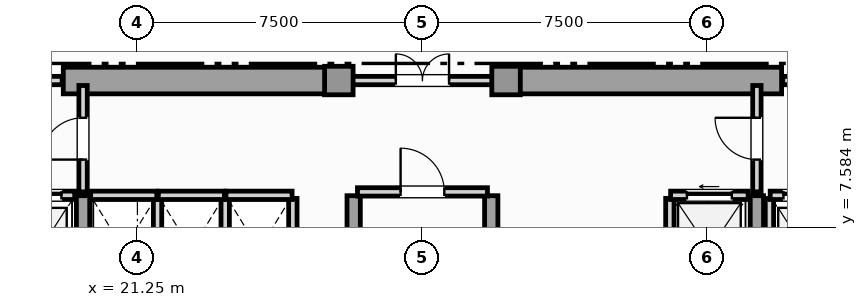
"""IFC4 building model, lengths in metres.
Left out: names, types, materials, properties, quantities, classifications, styles, units other than length and angle.
Written with IfcOpenShell. Run it as: python <this file> out.ifc"""

import sys

from ifc_helpers import new_model, si_unit, direction, frame, frame_2d, origin, origin_2d, place, context, subcontext, project, spatial, rectangle, extrude, element, fill, save


model = new_model("IFC4")
c1 = context("Model", 3, precision=1e-05, world=origin(), true_north=direction((0.0, 1.0)))
c2 = subcontext(c1, "Body", "Model", "MODEL_VIEW")
j1 = project(units=[si_unit("LENGTHUNIT", "METRE"), si_unit("PLANEANGLEUNIT", "RADIAN")], contexts=[c1])
p1 = place(None, origin())
s1 = spatial("IfcSite", under=j1, at=p1, CompositionType="ELEMENT")
p2 = place(p1, origin())
s2 = spatial("IfcBuilding", under=s1, at=p2, CompositionType="ELEMENT")
p3 = place(p2, frame((0.0, 0.0, 183.7)))
s3 = spatial("IfcBuildingStorey", under=s2, at=p3, CompositionType="ELEMENT", Elevation=183.7)
for number, where, z_axis, x_axis in (
    (1, (19.3, 11.45, 0.0), (0.0, 0.0, 1.0), (1.0, 0.0, 0.0)),
    (2, (30.9, 11.45, 0.0), (0.0, 0.0, 1.0), (1.0, 0.0, 0.0)),
):
    element("IfcWall", number, at=place(p3, frame(where, z_axis=z_axis, x_axis=x_axis)), inside=s3, PredefinedType="SHEAR", context=c2, shape_type="SweptSolid", body=[
        extrude(rectangle(XDim=7.3, YDim=0.7, at=frame_2d((3.65, 0.0))), origin(), (0.0, 0.0, 1.0), 3.63),
    ])
for number, where, z_axis, x_axis in (
    (3, (19.82, 0.92, 0.0), (0.0, 0.0, 1.0), (0.0, 1.0, 0.0)),
    (4, (26.94, 0.92, 0.0), (0.0, 0.0, 1.0), (0.0, 1.0, 0.0)),
    (5, (30.56, 0.92, 0.0), (0.0, 0.0, 1.0), (0.0, 1.0, 0.0)),
    (6, (37.55, 0.92, 0.0), (0.0, 0.0, 1.0), (0.0, 1.0, 0.0)),
):
    element("IfcWall", number, at=place(p3, frame(where, z_axis=z_axis, x_axis=x_axis)), inside=s3, PredefinedType="SHEAR", context=c2, shape_type="SweptSolid", body=[
        extrude(rectangle(XDim=7.5, YDim=0.35, at=frame_2d((3.75, 0.0))), origin(), (0.0, 0.0, 1.0), 3.63),
    ])
for number, where, z_axis, x_axis in (
    (7, (26.55, 11.45, 0.0), (0.0, 0.0, 1.0), (1.0, 0.0, 0.0)),
    (8, (30.95, 11.45, 0.0), (0.0, 0.0, 1.0), (1.0, 0.0, 0.0)),
):
    element("IfcColumn", number, at=place(p3, frame(where, z_axis=z_axis, x_axis=x_axis)), inside=s3, PredefinedType="COLUMN", context=c2, shape_type="SweptSolid", body=[
        extrude(rectangle(XDim=0.75, YDim=0.75, at=origin_2d()), origin(), (0.0, 0.0, 1.0), 3.85),
    ])
p4 = place(p3, frame((17.78, 8.43, 0.0), z_axis=(0.0, 0.0, 1.0), x_axis=(1.0, 0.0, 0.0)))
e9 = element("IfcWall", 9, at=p4, inside=s3, PredefinedType="SOLIDWALL", context=c2, shape_type="SweptSolid", body=[
    extrude(rectangle(XDim=1.82, YDim=0.22, at=frame_2d((0.91, 0.0))), origin(), (0.0, 0.0, 1.0), 3.63),
])
p5 = place(p4, frame((0.35, 0.0, 0.0)))
e10 = element("IfcOpeningElement", 10, at=p5, cuts=e9, PredefinedType="OPENING", context=c2, shape_type="SweptSolid", body=[
    extrude(rectangle(XDim=1.12, YDim=2.25, at=frame_2d((0.56, 1.125))), frame((0.0, 0.12, 0.0), z_axis=(0.0, -1.0, 0.0), x_axis=(1.0, 0.0, 0.0)), (0.0, 0.0, 1.0), 0.24),
])
p6 = place(p3, frame((37.88, 5.65, 0.0), z_axis=(0.0, 0.0, 1.0), x_axis=(0.0, 1.0, 0.0)))
e11 = element("IfcWall", 11, at=p6, inside=s3, PredefinedType="SOLIDWALL", context=c2, shape_type="SweptSolid", body=[
    extrude(rectangle(XDim=2.7, YDim=0.22, at=frame_2d((1.35, 0.0))), origin(), (0.0, 0.0, 1.0), 3.63),
])
p7 = place(p3, frame((37.9, 8.43, 0.0), z_axis=(0.0, 0.0, 1.0), x_axis=(1.0, 0.0, 0.0)))
e12 = element("IfcWall", 12, at=p7, inside=s3, PredefinedType="SOLIDWALL", context=c2, shape_type="SweptSolid", body=[
    extrude(rectangle(XDim=1.82, YDim=0.22, at=frame_2d((0.91, 0.0))), origin(), (0.0, 0.0, 1.0), 3.63),
])
p8 = place(p7, frame((0.35, 0.0, 0.0)))
e13 = element("IfcOpeningElement", 13, at=p8, cuts=e12, PredefinedType="OPENING", context=c2, shape_type="SweptSolid", body=[
    extrude(rectangle(XDim=1.12, YDim=2.25, at=frame_2d((0.56, 1.125))), frame((0.0, 0.12, 0.0), z_axis=(0.0, -1.0, 0.0), x_axis=(1.0, 0.0, 0.0)), (0.0, 0.0, 1.0), 0.24),
])
p9 = place(p3, frame((35.26, 5.65, 0.0), z_axis=(0.0, 0.0, 1.0), x_axis=(0.0, 1.0, 0.0)))
e14 = element("IfcWall", 14, at=p9, inside=s3, PredefinedType="SOLIDWALL", context=c2, shape_type="SweptSolid", body=[
    extrude(rectangle(XDim=2.7, YDim=0.22, at=frame_2d((1.35, 0.0))), origin(), (0.0, 0.0, 1.0), 3.63),
])
p10 = place(p3, frame((35.28, 8.43, 0.0), z_axis=(0.0, 0.0, 1.0), x_axis=(1.0, 0.0, 0.0)))
e15 = element("IfcWall", 15, at=p10, inside=s3, PredefinedType="SOLIDWALL", context=c2, shape_type="SweptSolid", body=[
    extrude(rectangle(XDim=2.04, YDim=0.22, at=frame_2d((1.02, 0.0))), origin(), (0.0, 0.0, 1.0), 3.63),
])
p11 = place(p10, frame((0.43, 0.0, 0.0)))
e16 = element("IfcOpeningElement", 16, at=p11, cuts=e15, PredefinedType="OPENING", context=c2, shape_type="SweptSolid", body=[
    extrude(rectangle(XDim=1.18, YDim=2.2, at=frame_2d((0.59, 1.1))), frame((0.0, 0.12, 0.0), z_axis=(0.0, -1.0, 0.0), x_axis=(1.0, 0.0, 0.0)), (0.0, 0.0, 1.0), 0.24),
])
p12 = place(p3, frame((21.78, 5.65, 0.0), z_axis=(0.0, 0.0, 1.0), x_axis=(0.0, 1.0, 0.0)))
e17 = element("IfcWall", 17, at=p12, inside=s3, PredefinedType="SOLIDWALL", context=c2, shape_type="SweptSolid", body=[
    extrude(rectangle(XDim=2.7, YDim=0.22, at=frame_2d((1.35, 0.0))), origin(), (0.0, 0.0, 1.0), 3.63),
])
p13 = place(p3, frame((20.02, 8.43, 0.0), z_axis=(0.0, 0.0, 1.0), x_axis=(1.0, 0.0, 0.0)))
e18 = element("IfcWall", 18, at=p13, inside=s3, PredefinedType="SOLIDWALL", context=c2, shape_type="SweptSolid", body=[
    extrude(rectangle(XDim=1.74, YDim=0.22, at=frame_2d((0.87, 0.0))), origin(), (0.0, 0.0, 1.0), 3.63),
])
p14 = place(p3, frame((23.56, 5.65, 0.0), z_axis=(0.0, 0.0, 1.0), x_axis=(0.0, 1.0, 0.0)))
e19 = element("IfcWall", 19, at=p14, inside=s3, PredefinedType="SOLIDWALL", context=c2, shape_type="SweptSolid", body=[
    extrude(rectangle(XDim=2.7, YDim=0.22, at=frame_2d((1.35, 0.0))), origin(), (0.0, 0.0, 1.0), 3.63),
])
p15 = place(p3, frame((21.8, 8.43, 0.0), z_axis=(0.0, 0.0, 1.0), x_axis=(1.0, 0.0, 0.0)))
e20 = element("IfcWall", 20, at=p15, inside=s3, PredefinedType="SOLIDWALL", context=c2, shape_type="SweptSolid", body=[
    extrude(rectangle(XDim=1.74, YDim=0.22, at=frame_2d((0.87, 0.0))), origin(), (0.0, 0.0, 1.0), 3.63),
])
p16 = place(p3, frame((25.34, 5.65, 0.0), z_axis=(0.0, 0.0, 1.0), x_axis=(0.0, 1.0, 0.0)))
e21 = element("IfcWall", 21, at=p16, inside=s3, PredefinedType="SOLIDWALL", context=c2, shape_type="SweptSolid", body=[
    extrude(rectangle(XDim=2.7, YDim=0.22, at=frame_2d((1.35, 0.0))), origin(), (0.0, 0.0, 1.0), 3.63),
])
p17 = place(p3, frame((23.58, 8.43, 0.0), z_axis=(0.0, 0.0, 1.0), x_axis=(1.0, 0.0, 0.0)))
e22 = element("IfcWall", 22, at=p17, inside=s3, PredefinedType="SOLIDWALL", context=c2, shape_type="SweptSolid", body=[
    extrude(rectangle(XDim=1.74, YDim=0.22, at=frame_2d((0.87, 0.0))), origin(), (0.0, 0.0, 1.0), 3.63),
])
p18 = place(p3, frame((27.04, 8.52, 0.0), z_axis=(0.0, 0.0, 1.0), x_axis=(1.0, 0.0, 0.0)))
e23 = element("IfcWall", 23, at=p18, inside=s3, PredefinedType="SOLIDWALL", context=c2, shape_type="SweptSolid", body=[
    extrude(rectangle(XDim=3.42, YDim=0.22, at=frame_2d((1.71, 0.0))), origin(), (0.0, 0.0, 1.0), 3.63),
])
p19 = place(p18, frame((1.135, 0.0, 0.0)))
e24 = element("IfcOpeningElement", 24, at=p19, cuts=e23, PredefinedType="OPENING", context=c2, shape_type="SweptSolid", body=[
    extrude(rectangle(XDim=1.15, YDim=2.2, at=frame_2d((0.575, 1.1))), frame((0.0, 0.12, 0.0), z_axis=(0.0, -1.0, 0.0), x_axis=(1.0, 0.0, 0.0)), (0.0, 0.0, 1.0), 0.24),
])
p20 = place(p3, frame((19.82, 8.52, 0.0), z_axis=(0.0, 0.0, 1.0), x_axis=(0.0, 1.0, 0.0)))
e25 = element("IfcWall", 25, at=p20, inside=s3, PredefinedType="SOLIDWALL", context=c2, shape_type="SweptSolid", body=[
    extrude(rectangle(XDim=2.8, YDim=0.22, at=frame_2d((1.4, 0.0))), origin(), (0.0, 0.0, 1.0), 3.085),
])
p21 = place(p20, frame((0.85, 0.0, 0.0)))
e26 = element("IfcOpeningElement", 26, at=p21, cuts=e25, PredefinedType="OPENING", context=c2, shape_type="SweptSolid", body=[
    extrude(rectangle(XDim=1.1, YDim=2.2, at=frame_2d((0.55, 1.1))), frame((0.0, 0.12, 0.0), z_axis=(0.0, -1.0, 0.0), x_axis=(1.0, 0.0, 0.0)), (0.0, 0.0, 1.0), 0.24),
])
p22 = place(p3, frame((37.55, 8.52, 0.0), z_axis=(0.0, 0.0, 1.0), x_axis=(0.0, 1.0, 0.0)))
e27 = element("IfcWall", 27, at=p22, inside=s3, PredefinedType="SOLIDWALL", context=c2, shape_type="SweptSolid", body=[
    extrude(rectangle(XDim=2.8, YDim=0.22, at=frame_2d((1.4, 0.0))), origin(), (0.0, 0.0, 1.0), 3.085),
])
p23 = place(p22, frame((0.85, 0.0, 0.0)))
e28 = element("IfcOpeningElement", 28, at=p23, cuts=e27, PredefinedType="OPENING", context=c2, shape_type="SweptSolid", body=[
    extrude(rectangle(XDim=1.1, YDim=2.2, at=frame_2d((0.55, 1.1))), frame((0.0, 0.12, 0.0), z_axis=(0.0, -1.0, 0.0), x_axis=(1.0, 0.0, 0.0)), (0.0, 0.0, 1.0), 0.24),
])
p24 = place(p3, frame((16.23, 11.45, 0.0), z_axis=(0.0, 0.0, 1.0), x_axis=(1.0, 0.0, 0.0)))
e29 = element("IfcWall", 29, at=p24, inside=s3, PredefinedType="SOLIDWALL", context=c2, shape_type="SweptSolid", body=[
    extrude(rectangle(XDim=3.04, YDim=0.22, at=frame_2d((1.52, 0.0))), origin(), (0.0, 0.0, 1.0), 3.63),
])
p25 = place(p24, frame((0.97, 0.0, 0.0)))
e30 = element("IfcOpeningElement", 30, at=p25, cuts=e29, PredefinedType="OPENING", context=c2, shape_type="SweptSolid", body=[
    extrude(rectangle(XDim=1.1, YDim=2.2, at=frame_2d((0.55, 1.1))), frame((0.0, 0.12, 0.0), z_axis=(0.0, -1.0, 0.0), x_axis=(1.0, 0.0, 0.0)), (0.0, 0.0, 1.0), 0.24),
])
p26 = place(p3, frame((26.63, 11.45, 0.0), z_axis=(0.0, 0.0, 1.0), x_axis=(1.0, 0.0, 0.0)))
e31 = element("IfcWall", 31, at=p26, inside=s3, PredefinedType="SOLIDWALL", context=c2, shape_type="SweptSolid", body=[
    extrude(rectangle(XDim=4.24, YDim=0.22, at=frame_2d((2.12, 0.0))), origin(), (0.0, 0.0, 1.0), 3.63),
])
p27 = place(p26, frame((1.42, 0.0, 0.0)))
e32 = element("IfcOpeningElement", 32, at=p27, cuts=e31, PredefinedType="OPENING", context=c2, shape_type="SweptSolid", body=[
    extrude(rectangle(XDim=1.4, YDim=2.2, at=frame_2d((0.7, 1.1))), frame((0.0, 0.12, 0.0), z_axis=(0.0, -1.0, 0.0), x_axis=(1.0, 0.0, 0.0)), (0.0, 0.0, 1.0), 0.24),
])
p28 = place(p3, frame((38.23, 11.45, 0.0), z_axis=(0.0, 0.0, 1.0), x_axis=(1.0, 0.0, 0.0)))
e33 = element("IfcWall", 33, at=p28, inside=s3, PredefinedType="SOLIDWALL", context=c2, shape_type="SweptSolid", body=[
    extrude(rectangle(XDim=3.04, YDim=0.22, at=frame_2d((1.52, 0.0))), origin(), (0.0, 0.0, 1.0), 3.63),
])
p29 = place(p28, frame((0.97, 0.0, 0.0)))
e34 = element("IfcOpeningElement", 34, at=p29, cuts=e33, PredefinedType="OPENING", context=c2, shape_type="SweptSolid", body=[
    extrude(rectangle(XDim=1.1, YDim=2.2, at=frame_2d((0.55, 1.1))), frame((0.0, 0.12, 0.0), z_axis=(0.0, -1.0, 0.0), x_axis=(1.0, 0.0, 0.0)), (0.0, 0.0, 1.0), 0.24),
])
p30 = place(p5, origin())
e35 = element("IfcDoor", 35, at=p30, inside=s3, OperationType="SLIDING_TO_LEFT", PredefinedType="DOOR", context=c2, shape_type="SweptSolid", body=[
    extrude(rectangle(XDim=1.12, YDim=2.25, at=frame_2d((0.56, 1.125))), frame((0.0, 0.025, 0.0), z_axis=(0.0, -1.0, 0.0), x_axis=(1.0, 0.0, 0.0)), (0.0, 0.0, 1.0), 0.05),
])
fill(e10, e35)
p31 = place(p8, origin())
e36 = element("IfcDoor", 36, at=p31, inside=s3, OperationType="SLIDING_TO_RIGHT", PredefinedType="DOOR", context=c2, shape_type="SweptSolid", body=[
    extrude(rectangle(XDim=1.12, YDim=2.25, at=frame_2d((0.56, 1.125))), frame((0.0, 0.025, 0.0), z_axis=(0.0, -1.0, 0.0), x_axis=(1.0, 0.0, 0.0)), (0.0, 0.0, 1.0), 0.05),
])
fill(e13, e36)
p32 = place(p11, origin())
e37 = element("IfcDoor", 37, at=p32, inside=s3, OperationType="SLIDING_TO_LEFT", PredefinedType="DOOR", context=c2, shape_type="SweptSolid", body=[
    extrude(rectangle(XDim=1.18, YDim=2.2, at=frame_2d((0.59, 1.1))), frame((0.0, 0.025, 0.0), z_axis=(0.0, -1.0, 0.0), x_axis=(1.0, 0.0, 0.0)), (0.0, 0.0, 1.0), 0.05),
])
fill(e16, e37)
p33 = place(p19, origin())
e38 = element("IfcDoor", 38, at=p33, inside=s3, OperationType="SINGLE_SWING_LEFT", PredefinedType="DOOR", context=c2, shape_type="SweptSolid", body=[
    extrude(rectangle(XDim=1.15, YDim=2.2, at=frame_2d((0.575, 1.1))), frame((0.0, 0.025, 0.0), z_axis=(0.0, -1.0, 0.0), x_axis=(1.0, 0.0, 0.0)), (0.0, 0.0, 1.0), 0.05),
])
fill(e24, e38)
p34 = place(p21, origin())
e39 = element("IfcDoor", 39, at=p34, inside=s3, OperationType="SINGLE_SWING_LEFT", PredefinedType="DOOR", context=c2, shape_type="SweptSolid", body=[
    extrude(rectangle(XDim=1.1, YDim=2.2, at=frame_2d((0.55, 1.1))), frame((0.0, 0.025, 0.0), z_axis=(0.0, -1.0, 0.0), x_axis=(1.0, 0.0, 0.0)), (0.0, 0.0, 1.0), 0.05),
])
fill(e26, e39)
p35 = place(p23, origin())
e40 = element("IfcDoor", 40, at=p35, inside=s3, OperationType="SINGLE_SWING_RIGHT", PredefinedType="DOOR", context=c2, shape_type="SweptSolid", body=[
    extrude(rectangle(XDim=1.1, YDim=2.2, at=frame_2d((0.55, 1.1))), frame((0.0, 0.025, 0.0), z_axis=(0.0, -1.0, 0.0), x_axis=(1.0, 0.0, 0.0)), (0.0, 0.0, 1.0), 0.05),
])
fill(e28, e40)
p36 = place(p27, origin())
e41 = element("IfcDoor", 41, at=p36, inside=s3, OperationType="DOUBLE_DOOR_SINGLE_SWING", PredefinedType="DOOR", context=c2, shape_type="SweptSolid", body=[
    extrude(rectangle(XDim=1.4, YDim=2.2, at=frame_2d((0.7, 1.1))), frame((0.0, 0.025, 0.0), z_axis=(0.0, -1.0, 0.0), x_axis=(1.0, 0.0, 0.0)), (0.0, 0.0, 1.0), 0.05),
])
fill(e32, e41)
save(model, sys.argv[1])
